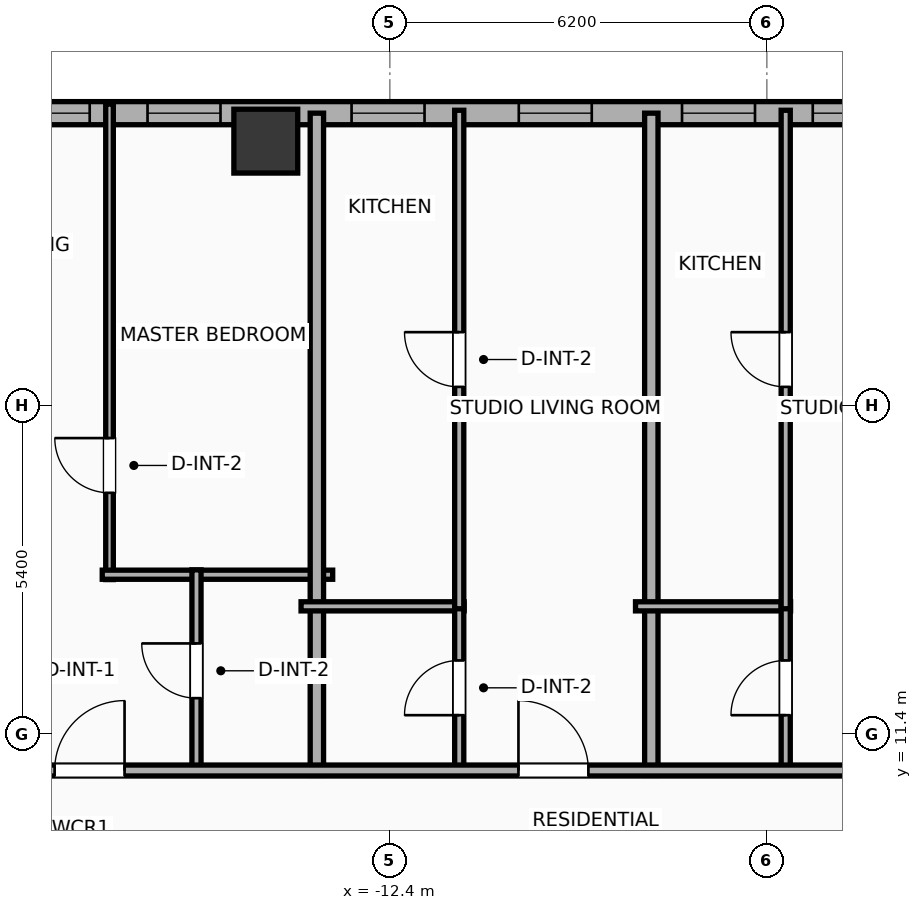
"""IFC4 building model, lengths in metres.
Left out: names, types, materials, properties, quantities, classifications, styles, units other than length and angle.
Written with IfcOpenShell. Run it as: python <this file> out.ifc"""

import sys

from ifc_helpers import new_model, si_unit, direction, frame, frame_2d, origin, origin_2d, place, context, subcontext, project, spatial, rectangle, hollow_rectangle, extrude, element, fill, save


model = new_model("IFC4")
c1 = context("Model", 3, precision=1e-05, world=origin(), true_north=direction((0.0, 1.0)))
c2 = subcontext(c1, "Body", "Model", "MODEL_VIEW")
j1 = project(units=[si_unit("LENGTHUNIT", "METRE"), si_unit("PLANEANGLEUNIT", "RADIAN")], contexts=[c1])
p1 = place(None, origin())
s1 = spatial("IfcSite", under=j1, at=p1, CompositionType="ELEMENT")
p2 = place(p1, origin())
s2 = spatial("IfcBuilding", under=s1, at=p2, CompositionType="ELEMENT")
p3 = place(p2, frame((0.0, 0.0, 132.6)))
s3 = spatial("IfcBuildingStorey", under=s2, at=p3, CompositionType="ELEMENT", Elevation=132.6)
p4 = place(p3, frame((-14.44, 21.15, 0.0), z_axis=(0.0, 0.0, 1.0), x_axis=(1.0, 0.0, 0.0)))
e1 = element("IfcColumn", 1, at=p4, inside=s3, PredefinedType="COLUMN", context=c2, shape_type="SweptSolid", body=[
    extrude(hollow_rectangle(XDim=1.05, YDim=1.05, WallThickness=0.036, at=origin_2d()), origin(), (0.0, 0.0, 1.0), 3.9),
])
p5 = place(p3, frame((-25.381, 21.61, 0.0), z_axis=(0.0, 0.0, 1.0), x_axis=(1.0, 0.0, 0.0)))
e2 = element("IfcWall", 2, at=p5, inside=s3, PredefinedType="ELEMENTEDWALL", context=c2, shape_type="SweptSolid", body=[
    extrude(rectangle(XDim=54.763, YDim=0.38, at=frame_2d((27.381, 0.0))), origin(), (0.0, 0.0, 1.0), 3.65),
])
p6 = place(p5, frame((5.645, 0.0, 0.75)))
e3 = element("IfcOpeningElement", 3, at=p6, cuts=e2, PredefinedType="OPENING", context=c2, shape_type="SweptSolid", body=[
    extrude(rectangle(XDim=2.4, YDim=2.1, at=frame_2d((1.2, 1.05))), frame((0.0, 0.2, 0.0), z_axis=(0.0, -1.0, 0.0), x_axis=(1.0, 0.0, 0.0)), (0.0, 0.0, 1.0), 0.4),
])
p7 = place(p5, frame((45.067, 0.0, 0.75)))
e4 = element("IfcOpeningElement", 4, at=p7, cuts=e2, PredefinedType="OPENING", context=c2, shape_type="SweptSolid", body=[
    extrude(rectangle(XDim=2.4, YDim=2.1, at=frame_2d((1.2, 1.05))), frame((0.0, 0.2, 0.0), z_axis=(0.0, -1.0, 0.0), x_axis=(1.0, 0.0, 0.0)), (0.0, 0.0, 1.0), 0.4),
])
p8 = place(p5, frame((1.831, 0.0, 0.75)))
e5 = element("IfcOpeningElement", 5, at=p8, cuts=e2, PredefinedType="OPENING", context=c2, shape_type="SweptSolid", body=[
    extrude(rectangle(XDim=1.2, YDim=2.05, at=frame_2d((0.6, 1.025))), frame((0.0, 0.2, 0.0), z_axis=(0.0, -1.0, 0.0), x_axis=(1.0, 0.0, 0.0)), (0.0, 0.0, 1.0), 0.4),
])
p9 = place(p5, frame((8.996, 0.0, 0.75)))
e6 = element("IfcOpeningElement", 6, at=p9, cuts=e2, PredefinedType="OPENING", context=c2, shape_type="SweptSolid", body=[
    extrude(rectangle(XDim=1.2, YDim=2.05, at=frame_2d((0.6, 1.025))), frame((0.0, 0.2, 0.0), z_axis=(0.0, -1.0, 0.0), x_axis=(1.0, 0.0, 0.0)), (0.0, 0.0, 1.0), 0.4),
])
p10 = place(p5, frame((15.102, 0.0, 0.75)))
e7 = element("IfcOpeningElement", 7, at=p10, cuts=e2, PredefinedType="OPENING", context=c2, shape_type="SweptSolid", body=[
    extrude(rectangle(XDim=1.2, YDim=2.05, at=frame_2d((0.6, 1.025))), frame((0.0, 0.2, 0.0), z_axis=(0.0, -1.0, 0.0), x_axis=(1.0, 0.0, 0.0)), (0.0, 0.0, 1.0), 0.4),
])
p11 = place(p5, frame((12.352, 0.0, 0.75)))
e8 = element("IfcOpeningElement", 8, at=p11, cuts=e2, PredefinedType="OPENING", context=c2, shape_type="SweptSolid", body=[
    extrude(rectangle(XDim=1.2, YDim=2.05, at=frame_2d((0.6, 1.025))), frame((0.0, 0.2, 0.0), z_axis=(0.0, -1.0, 0.0), x_axis=(1.0, 0.0, 0.0)), (0.0, 0.0, 1.0), 0.4),
])
p12 = place(p5, frame((19.936, 0.0, 0.75)))
e9 = element("IfcOpeningElement", 9, at=p12, cuts=e2, PredefinedType="OPENING", context=c2, shape_type="SweptSolid", body=[
    extrude(rectangle(XDim=1.2, YDim=2.05, at=frame_2d((0.6, 1.025))), frame((0.0, 0.2, 0.0), z_axis=(0.0, -1.0, 0.0), x_axis=(1.0, 0.0, 0.0)), (0.0, 0.0, 1.0), 0.4),
])
p13 = place(p5, frame((17.786, 0.0, 0.75)))
e10 = element("IfcOpeningElement", 10, at=p13, cuts=e2, PredefinedType="OPENING", context=c2, shape_type="SweptSolid", body=[
    extrude(rectangle(XDim=1.2, YDim=2.05, at=frame_2d((0.6, 1.025))), frame((0.0, 0.2, 0.0), z_axis=(0.0, -1.0, 0.0), x_axis=(1.0, 0.0, 0.0)), (0.0, 0.0, 1.0), 0.4),
])
p14 = place(p5, frame((23.826, 0.0, 0.75)))
e11 = element("IfcOpeningElement", 11, at=p14, cuts=e2, PredefinedType="OPENING", context=c2, shape_type="SweptSolid", body=[
    extrude(rectangle(XDim=1.2, YDim=2.05, at=frame_2d((0.6, 1.025))), frame((0.0, 0.2, 0.0), z_axis=(0.0, -1.0, 0.0), x_axis=(1.0, 0.0, 0.0)), (0.0, 0.0, 1.0), 0.4),
])
p15 = place(p5, frame((26.576, 0.0, 0.75)))
e12 = element("IfcOpeningElement", 12, at=p15, cuts=e2, PredefinedType="OPENING", context=c2, shape_type="SweptSolid", body=[
    extrude(rectangle(XDim=1.2, YDim=2.05, at=frame_2d((0.6, 1.025))), frame((0.0, 0.2, 0.0), z_axis=(0.0, -1.0, 0.0), x_axis=(1.0, 0.0, 0.0)), (0.0, 0.0, 1.0), 0.4),
])
p16 = place(p5, frame((30.431, 0.0, 0.75)))
e13 = element("IfcOpeningElement", 13, at=p16, cuts=e2, PredefinedType="OPENING", context=c2, shape_type="SweptSolid", body=[
    extrude(rectangle(XDim=1.2, YDim=2.05, at=frame_2d((0.6, 1.025))), frame((0.0, 0.2, 0.0), z_axis=(0.0, -1.0, 0.0), x_axis=(1.0, 0.0, 0.0)), (0.0, 0.0, 1.0), 0.4),
])
p17 = place(p5, frame((38.581, 0.0, 0.75)))
e14 = element("IfcOpeningElement", 14, at=p17, cuts=e2, PredefinedType="OPENING", context=c2, shape_type="SweptSolid", body=[
    extrude(rectangle(XDim=1.2, YDim=2.05, at=frame_2d((0.6, 1.025))), frame((0.0, 0.2, 0.0), z_axis=(0.0, -1.0, 0.0), x_axis=(1.0, 0.0, 0.0)), (0.0, 0.0, 1.0), 0.4),
])
p18 = place(p5, frame((34.786, 0.0, 0.75)))
e15 = element("IfcOpeningElement", 15, at=p18, cuts=e2, PredefinedType="OPENING", context=c2, shape_type="SweptSolid", body=[
    extrude(rectangle(XDim=1.2, YDim=2.05, at=frame_2d((0.6, 1.025))), frame((0.0, 0.2, 0.0), z_axis=(0.0, -1.0, 0.0), x_axis=(1.0, 0.0, 0.0)), (0.0, 0.0, 1.0), 0.4),
])
p19 = place(p5, frame((41.876, 0.0, 0.75)))
e16 = element("IfcOpeningElement", 16, at=p19, cuts=e2, PredefinedType="OPENING", context=c2, shape_type="SweptSolid", body=[
    extrude(rectangle(XDim=1.2, YDim=2.05, at=frame_2d((0.6, 1.025))), frame((0.0, 0.2, 0.0), z_axis=(0.0, -1.0, 0.0), x_axis=(1.0, 0.0, 0.0)), (0.0, 0.0, 1.0), 0.4),
])
p20 = place(p5, frame((49.385, 0.0, 0.75)))
e17 = element("IfcOpeningElement", 17, at=p20, cuts=e2, PredefinedType="OPENING", context=c2, shape_type="SweptSolid", body=[
    extrude(rectangle(XDim=1.2, YDim=2.05, at=frame_2d((0.6, 1.025))), frame((0.0, 0.2, 0.0), z_axis=(0.0, -1.0, 0.0), x_axis=(1.0, 0.0, 0.0)), (0.0, 0.0, 1.0), 0.4),
])
p21 = place(p5, frame((52.181, 0.0, 0.75)))
e18 = element("IfcOpeningElement", 18, at=p21, cuts=e2, PredefinedType="OPENING", context=c2, shape_type="SweptSolid", body=[
    extrude(rectangle(XDim=1.2, YDim=2.05, at=frame_2d((0.6, 1.025))), frame((0.0, 0.2, 0.0), z_axis=(0.0, -1.0, 0.0), x_axis=(1.0, 0.0, 0.0)), (0.0, 0.0, 1.0), 0.4),
])
p22 = place(p3, frame((-17.01, 13.94, 0.0), z_axis=(0.0, 0.0, 1.0), x_axis=(0.0, 1.0, 0.0)))
e19 = element("IfcWall", 19, at=p22, inside=s3, PredefinedType="PARTITIONING", context=c2, shape_type="SweptSolid", body=[
    extrude(rectangle(XDim=7.82, YDim=0.125, at=frame_2d((3.91, 0.0))), origin(), (0.0, 0.0, 1.0), 3.65),
])
p23 = place(p22, frame((1.427, 0.0, 0.0)))
e20 = element("IfcOpeningElement", 20, at=p23, cuts=e19, PredefinedType="OPENING", context=c2, shape_type="SweptSolid", body=[
    extrude(rectangle(XDim=0.9, YDim=2.05, at=frame_2d((0.45, 1.025))), frame((0.0, 0.073, 0.0), z_axis=(0.0, -1.0, 0.0), x_axis=(1.0, 0.0, 0.0)), (0.0, 0.0, 1.0), 0.145),
])
p24 = place(p3, frame((-17.13, 14.02, 0.0), z_axis=(0.0, 0.0, 1.0), x_axis=(1.0, 0.0, 0.0)))
e21 = element("IfcWall", 21, at=p24, inside=s3, PredefinedType="PLUMBINGWALL", context=c2, shape_type="SweptSolid", body=[
    extrude(rectangle(XDim=3.79, YDim=0.15, at=frame_2d((1.895, 0.0))), origin(), (0.0, 0.0, 1.0), 3.65),
])
p25 = place(p3, frame((-15.58, 10.78, 0.0), z_axis=(0.0, 0.0, 1.0), x_axis=(0.0, 1.0, 0.0)))
e22 = element("IfcWall", 22, at=p25, inside=s3, PredefinedType="PLUMBINGWALL", context=c2, shape_type="SweptSolid", body=[
    extrude(rectangle(XDim=3.32, YDim=0.15, at=frame_2d((1.66, 0.0))), origin(), (0.0, 0.0, 1.0), 3.65),
])
p26 = place(p25, frame((1.21, 0.0, 0.0)))
e23 = element("IfcOpeningElement", 23, at=p26, cuts=e22, PredefinedType="OPENING", context=c2, shape_type="SweptSolid", body=[
    extrude(rectangle(XDim=0.9, YDim=2.05, at=frame_2d((0.45, 1.025))), frame((0.0, 0.085, 0.0), z_axis=(0.0, -1.0, 0.0), x_axis=(1.0, 0.0, 0.0)), (0.0, 0.0, 1.0), 0.17),
])
p27 = place(p3, frame((-13.6, 10.72, 0.0), z_axis=(0.0, 0.0, 1.0), x_axis=(0.0, 1.0, 0.0)))
e24 = element("IfcWall", 24, at=p27, inside=s3, PredefinedType="PARTITIONING", context=c2, shape_type="SweptSolid", body=[
    extrude(rectangle(XDim=10.89, YDim=0.22, at=frame_2d((5.445, 0.0))), origin(), (0.0, 0.0, 1.0), 3.65),
])
p28 = place(p3, frame((-13.86, 13.5, 0.0), z_axis=(0.0, 0.0, 1.0), x_axis=(1.0, 0.0, 0.0)))
e25 = element("IfcWall", 25, at=p28, inside=s3, PredefinedType="PLUMBINGWALL", context=c2, shape_type="SweptSolid", body=[
    extrude(rectangle(XDim=2.681, YDim=0.15, at=frame_2d((1.341, 0.0))), origin(), (0.0, 0.0, 1.0), 3.65),
])
p29 = place(p3, frame((-11.259, 10.78, 0.0), z_axis=(0.0, 0.0, 1.0), x_axis=(0.0, 1.0, 0.0)))
e26 = element("IfcWall", 26, at=p29, inside=s3, PredefinedType="PLUMBINGWALL", context=c2, shape_type="SweptSolid", body=[
    extrude(rectangle(XDim=2.76, YDim=0.15, at=frame_2d((1.38, 0.0))), origin(), (0.0, 0.0, 1.0), 3.65),
])
p30 = place(p29, frame((0.93, 0.0, 0.0)))
e27 = element("IfcOpeningElement", 27, at=p30, cuts=e26, PredefinedType="OPENING", context=c2, shape_type="SweptSolid", body=[
    extrude(rectangle(XDim=0.9, YDim=2.05, at=frame_2d((0.45, 1.025))), frame((0.0, 0.085, 0.0), z_axis=(0.0, -1.0, 0.0), x_axis=(1.0, 0.0, 0.0)), (0.0, 0.0, 1.0), 0.17),
])
p31 = place(p3, frame((-11.259, 13.46, 0.0), z_axis=(0.0, 0.0, 1.0), x_axis=(0.0, 1.0, 0.0)))
e28 = element("IfcWall", 28, at=p31, inside=s3, PredefinedType="PLUMBINGWALL", context=c2, shape_type="SweptSolid", body=[
    extrude(rectangle(XDim=8.198, YDim=0.15, at=frame_2d((4.099, 0.0))), origin(), (0.0, 0.0, 1.0), 3.65),
])
p32 = place(p31, frame((3.649, 0.0, 0.0)))
e29 = element("IfcOpeningElement", 29, at=p32, cuts=e28, PredefinedType="OPENING", context=c2, shape_type="SweptSolid", body=[
    extrude(rectangle(XDim=0.9, YDim=2.05, at=frame_2d((0.45, 1.025))), frame((0.0, 0.085, 0.0), z_axis=(0.0, -1.0, 0.0), x_axis=(1.0, 0.0, 0.0)), (0.0, 0.0, 1.0), 0.17),
])
p33 = place(p3, frame((-8.1, 10.72, 0.0), z_axis=(0.0, 0.0, 1.0), x_axis=(0.0, 1.0, 0.0)))
e30 = element("IfcWall", 30, at=p33, inside=s3, PredefinedType="PARTITIONING", context=c2, shape_type="SweptSolid", body=[
    extrude(rectangle(XDim=10.89, YDim=0.22, at=frame_2d((5.445, 0.0))), origin(), (0.0, 0.0, 1.0), 3.65),
])
p34 = place(p3, frame((-8.36, 13.5, 0.0), z_axis=(0.0, 0.0, 1.0), x_axis=(1.0, 0.0, 0.0)))
e31 = element("IfcWall", 31, at=p34, inside=s3, PredefinedType="PLUMBINGWALL", context=c2, shape_type="SweptSolid", body=[
    extrude(rectangle(XDim=2.55, YDim=0.15, at=frame_2d((1.275, 0.0))), origin(), (0.0, 0.0, 1.0), 3.65),
])
p35 = place(p3, frame((-5.89, 10.78, 0.0), z_axis=(0.0, 0.0, 1.0), x_axis=(0.0, 1.0, 0.0)))
e32 = element("IfcWall", 32, at=p35, inside=s3, PredefinedType="PLUMBINGWALL", context=c2, shape_type="SweptSolid", body=[
    extrude(rectangle(XDim=2.76, YDim=0.15, at=frame_2d((1.38, 0.0))), origin(), (0.0, 0.0, 1.0), 3.65),
])
p36 = place(p35, frame((0.93, 0.0, 0.0)))
e33 = element("IfcOpeningElement", 33, at=p36, cuts=e32, PredefinedType="OPENING", context=c2, shape_type="SweptSolid", body=[
    extrude(rectangle(XDim=0.9, YDim=2.05, at=frame_2d((0.45, 1.025))), frame((0.0, 0.085, 0.0), z_axis=(0.0, -1.0, 0.0), x_axis=(1.0, 0.0, 0.0)), (0.0, 0.0, 1.0), 0.17),
])
p37 = place(p3, frame((-5.89, 13.46, 0.0), z_axis=(0.0, 0.0, 1.0), x_axis=(0.0, 1.0, 0.0)))
e34 = element("IfcWall", 34, at=p37, inside=s3, PredefinedType="PLUMBINGWALL", context=c2, shape_type="SweptSolid", body=[
    extrude(rectangle(XDim=8.198, YDim=0.15, at=frame_2d((4.099, 0.0))), origin(), (0.0, 0.0, 1.0), 3.65),
])
p38 = place(p37, frame((3.649, 0.0, 0.0)))
e35 = element("IfcOpeningElement", 35, at=p38, cuts=e34, PredefinedType="OPENING", context=c2, shape_type="SweptSolid", body=[
    extrude(rectangle(XDim=0.9, YDim=2.05, at=frame_2d((0.45, 1.025))), frame((0.0, 0.085, 0.0), z_axis=(0.0, -1.0, 0.0), x_axis=(1.0, 0.0, 0.0)), (0.0, 0.0, 1.0), 0.17),
])
p39 = place(p3, frame((-29.21, 10.8, 0.0), z_axis=(0.0, 0.0, 1.0), x_axis=(1.0, 0.0, 0.0)))
e36 = element("IfcWall", 36, at=p39, inside=s3, PredefinedType="PARTITIONING", context=c2, shape_type="SweptSolid", body=[
    extrude(rectangle(XDim=62.42, YDim=0.18, at=frame_2d((31.21, 0.0))), origin(), (0.0, 0.0, 1.0), 3.65),
])
p40 = place(p39, frame((3.457, 0.0, 0.0)))
e37 = element("IfcOpeningElement", 37, at=p40, cuts=e36, PredefinedType="OPENING", context=c2, shape_type="SweptSolid", body=[
    extrude(rectangle(XDim=1.15, YDim=2.05, at=frame_2d((0.575, 1.025))), frame((0.0, 0.1, 0.0), z_axis=(0.0, -1.0, 0.0), x_axis=(1.0, 0.0, 0.0)), (0.0, 0.0, 1.0), 0.2),
])
p41 = place(p39, frame((11.297, 0.0, 0.0)))
e38 = element("IfcOpeningElement", 38, at=p41, cuts=e36, PredefinedType="OPENING", context=c2, shape_type="SweptSolid", body=[
    extrude(rectangle(XDim=1.15, YDim=2.05, at=frame_2d((0.575, 1.025))), frame((0.0, 0.1, 0.0), z_axis=(0.0, -1.0, 0.0), x_axis=(1.0, 0.0, 0.0)), (0.0, 0.0, 1.0), 0.2),
])
p42 = place(p39, frame((18.925, 0.0, 0.0)))
e39 = element("IfcOpeningElement", 39, at=p42, cuts=e36, PredefinedType="OPENING", context=c2, shape_type="SweptSolid", body=[
    extrude(rectangle(XDim=1.15, YDim=2.05, at=frame_2d((0.575, 1.025))), frame((0.0, 0.1, 0.0), z_axis=(0.0, -1.0, 0.0), x_axis=(1.0, 0.0, 0.0)), (0.0, 0.0, 1.0), 0.2),
])
p43 = place(p39, frame((24.362, 0.0, 0.0)))
e40 = element("IfcOpeningElement", 40, at=p43, cuts=e36, PredefinedType="OPENING", context=c2, shape_type="SweptSolid", body=[
    extrude(rectangle(XDim=1.15, YDim=2.05, at=frame_2d((0.575, 1.025))), frame((0.0, 0.1, 0.0), z_axis=(0.0, -1.0, 0.0), x_axis=(1.0, 0.0, 0.0)), (0.0, 0.0, 1.0), 0.2),
])
p44 = place(p39, frame((27.708, 0.0, 0.0)))
e41 = element("IfcOpeningElement", 41, at=p44, cuts=e36, PredefinedType="OPENING", context=c2, shape_type="SweptSolid", body=[
    extrude(rectangle(XDim=1.15, YDim=2.05, at=frame_2d((0.575, 1.025))), frame((0.0, 0.1, 0.0), z_axis=(0.0, -1.0, 0.0), x_axis=(1.0, 0.0, 0.0)), (0.0, 0.0, 1.0), 0.2),
])
p45 = place(p39, frame((34.618, 0.0, 0.0)))
e42 = element("IfcOpeningElement", 42, at=p45, cuts=e36, PredefinedType="OPENING", context=c2, shape_type="SweptSolid", body=[
    extrude(rectangle(XDim=0.9, YDim=2.05, at=frame_2d((0.45, 1.025))), frame((0.0, 0.1, 0.0), z_axis=(0.0, -1.0, 0.0), x_axis=(1.0, 0.0, 0.0)), (0.0, 0.0, 1.0), 0.2),
])
p46 = place(p39, frame((43.106, 0.0, 0.0)))
e43 = element("IfcOpeningElement", 43, at=p46, cuts=e36, PredefinedType="OPENING", context=c2, shape_type="SweptSolid", body=[
    extrude(rectangle(XDim=1.15, YDim=2.05, at=frame_2d((0.575, 1.025))), frame((0.0, 0.1, 0.0), z_axis=(0.0, -1.0, 0.0), x_axis=(1.0, 0.0, 0.0)), (0.0, 0.0, 1.0), 0.2),
])
p47 = place(p39, frame((51.777, 0.0, 0.0)))
e44 = element("IfcOpeningElement", 44, at=p47, cuts=e36, PredefinedType="OPENING", context=c2, shape_type="SweptSolid", body=[
    extrude(rectangle(XDim=0.9, YDim=2.05, at=frame_2d((0.45, 1.025))), frame((0.0, 0.1, 0.0), z_axis=(0.0, -1.0, 0.0), x_axis=(1.0, 0.0, 0.0)), (0.0, 0.0, 1.0), 0.2),
])
p48 = place(p39, frame((58.718, 0.0, 0.0)))
e45 = element("IfcOpeningElement", 45, at=p48, cuts=e36, PredefinedType="OPENING", context=c2, shape_type="SweptSolid", body=[
    extrude(rectangle(XDim=0.9, YDim=2.05, at=frame_2d((0.45, 1.025))), frame((0.0, 0.1, 0.0), z_axis=(0.0, -1.0, 0.0), x_axis=(1.0, 0.0, 0.0)), (0.0, 0.0, 1.0), 0.2),
])
p49 = place(p6, origin())
e46 = element("IfcWindow", 46, at=p49, inside=s3, PartitioningType="SINGLE_PANEL", PredefinedType="WINDOW", context=c2, shape_type="SweptSolid", body=[
    extrude(rectangle(XDim=2.4, YDim=2.1, at=frame_2d((1.2, 1.05))), frame((0.0, 0.03, 0.0), z_axis=(0.0, -1.0, 0.0), x_axis=(1.0, 0.0, 0.0)), (0.0, 0.0, 1.0), 0.06),
])
fill(e3, e46)
p50 = place(p9, origin())
e47 = element("IfcWindow", 47, at=p50, inside=s3, PartitioningType="SINGLE_PANEL", PredefinedType="WINDOW", context=c2, shape_type="SweptSolid", body=[
    extrude(rectangle(XDim=1.2, YDim=2.05, at=frame_2d((0.6, 1.025))), frame((0.0, 0.03, 0.0), z_axis=(0.0, -1.0, 0.0), x_axis=(1.0, 0.0, 0.0)), (0.0, 0.0, 1.0), 0.06),
])
fill(e6, e47)
p51 = place(p10, origin())
e48 = element("IfcWindow", 48, at=p51, inside=s3, PartitioningType="SINGLE_PANEL", PredefinedType="WINDOW", context=c2, shape_type="SweptSolid", body=[
    extrude(rectangle(XDim=1.2, YDim=2.05, at=frame_2d((0.6, 1.025))), frame((0.0, 0.03, 0.0), z_axis=(0.0, -1.0, 0.0), x_axis=(1.0, 0.0, 0.0)), (0.0, 0.0, 1.0), 0.06),
])
fill(e7, e48)
p52 = place(p11, origin())
e49 = element("IfcWindow", 49, at=p52, inside=s3, PartitioningType="SINGLE_PANEL", PredefinedType="WINDOW", context=c2, shape_type="SweptSolid", body=[
    extrude(rectangle(XDim=1.2, YDim=2.05, at=frame_2d((0.6, 1.025))), frame((0.0, 0.03, 0.0), z_axis=(0.0, -1.0, 0.0), x_axis=(1.0, 0.0, 0.0)), (0.0, 0.0, 1.0), 0.06),
])
fill(e8, e49)
p53 = place(p12, origin())
e50 = element("IfcWindow", 50, at=p53, inside=s3, PartitioningType="SINGLE_PANEL", PredefinedType="WINDOW", context=c2, shape_type="SweptSolid", body=[
    extrude(rectangle(XDim=1.2, YDim=2.05, at=frame_2d((0.6, 1.025))), frame((0.0, 0.03, 0.0), z_axis=(0.0, -1.0, 0.0), x_axis=(1.0, 0.0, 0.0)), (0.0, 0.0, 1.0), 0.06),
])
fill(e9, e50)
p54 = place(p13, origin())
e51 = element("IfcWindow", 51, at=p54, inside=s3, PartitioningType="SINGLE_PANEL", PredefinedType="WINDOW", context=c2, shape_type="SweptSolid", body=[
    extrude(rectangle(XDim=1.2, YDim=2.05, at=frame_2d((0.6, 1.025))), frame((0.0, 0.03, 0.0), z_axis=(0.0, -1.0, 0.0), x_axis=(1.0, 0.0, 0.0)), (0.0, 0.0, 1.0), 0.06),
])
fill(e10, e51)
p55 = place(p23, origin())
e52 = element("IfcDoor", 52, at=p55, inside=s3, OperationType="SINGLE_SWING_RIGHT", PredefinedType="DOOR", context=c2, shape_type="SweptSolid", body=[
    extrude(rectangle(XDim=0.9, YDim=2.05, at=frame_2d((0.45, 1.025))), frame((0.0, 0.025, 0.0), z_axis=(0.0, -1.0, 0.0), x_axis=(1.0, 0.0, 0.0)), (0.0, 0.0, 1.0), 0.05),
])
fill(e20, e52)
p56 = place(p26, origin())
e53 = element("IfcDoor", 53, at=p56, inside=s3, OperationType="SINGLE_SWING_RIGHT", PredefinedType="DOOR", context=c2, shape_type="SweptSolid", body=[
    extrude(rectangle(XDim=0.9, YDim=2.05, at=frame_2d((0.45, 1.025))), frame((0.0, 0.025, 0.0), z_axis=(0.0, -1.0, 0.0), x_axis=(1.0, 0.0, 0.0)), (0.0, 0.0, 1.0), 0.05),
])
fill(e23, e53)
p57 = place(p30, origin())
e54 = element("IfcDoor", 54, at=p57, inside=s3, OperationType="SINGLE_SWING_LEFT", PredefinedType="DOOR", context=c2, shape_type="SweptSolid", body=[
    extrude(rectangle(XDim=0.9, YDim=2.05, at=frame_2d((0.45, 1.025))), frame((0.0, 0.025, 0.0), z_axis=(0.0, -1.0, 0.0), x_axis=(1.0, 0.0, 0.0)), (0.0, 0.0, 1.0), 0.05),
])
fill(e27, e54)
p58 = place(p32, origin())
e55 = element("IfcDoor", 55, at=p58, inside=s3, OperationType="SINGLE_SWING_RIGHT", PredefinedType="DOOR", context=c2, shape_type="SweptSolid", body=[
    extrude(rectangle(XDim=0.9, YDim=2.05, at=frame_2d((0.45, 1.025))), frame((0.0, 0.025, 0.0), z_axis=(0.0, -1.0, 0.0), x_axis=(1.0, 0.0, 0.0)), (0.0, 0.0, 1.0), 0.05),
])
fill(e29, e55)
p59 = place(p36, origin())
e56 = element("IfcDoor", 56, at=p59, inside=s3, OperationType="SINGLE_SWING_LEFT", PredefinedType="DOOR", context=c2, shape_type="SweptSolid", body=[
    extrude(rectangle(XDim=0.9, YDim=2.05, at=frame_2d((0.45, 1.025))), frame((0.0, 0.025, 0.0), z_axis=(0.0, -1.0, 0.0), x_axis=(1.0, 0.0, 0.0)), (0.0, 0.0, 1.0), 0.05),
])
fill(e33, e56)
p60 = place(p38, origin())
e57 = element("IfcDoor", 57, at=p60, inside=s3, OperationType="SINGLE_SWING_RIGHT", PredefinedType="DOOR", context=c2, shape_type="SweptSolid", body=[
    extrude(rectangle(XDim=0.9, YDim=2.05, at=frame_2d((0.45, 1.025))), frame((0.0, 0.025, 0.0), z_axis=(0.0, -1.0, 0.0), x_axis=(1.0, 0.0, 0.0)), (0.0, 0.0, 1.0), 0.05),
])
fill(e35, e57)
p61 = place(p41, origin())
e58 = element("IfcDoor", 58, at=p61, inside=s3, OperationType="SINGLE_SWING_RIGHT", PredefinedType="DOOR", context=c2, shape_type="SweptSolid", body=[
    extrude(rectangle(XDim=1.15, YDim=2.05, at=frame_2d((0.575, 1.025))), frame((0.0, 0.025, 0.0), z_axis=(0.0, -1.0, 0.0), x_axis=(1.0, 0.0, 0.0)), (0.0, 0.0, 1.0), 0.05),
])
fill(e38, e58)
p62 = place(p42, origin())
e59 = element("IfcDoor", 59, at=p62, inside=s3, OperationType="SINGLE_SWING_LEFT", PredefinedType="DOOR", context=c2, shape_type="SweptSolid", body=[
    extrude(rectangle(XDim=1.15, YDim=2.05, at=frame_2d((0.575, 1.025))), frame((0.0, 0.025, 0.0), z_axis=(0.0, -1.0, 0.0), x_axis=(1.0, 0.0, 0.0)), (0.0, 0.0, 1.0), 0.05),
])
fill(e39, e59)
save(model, sys.argv[1])
